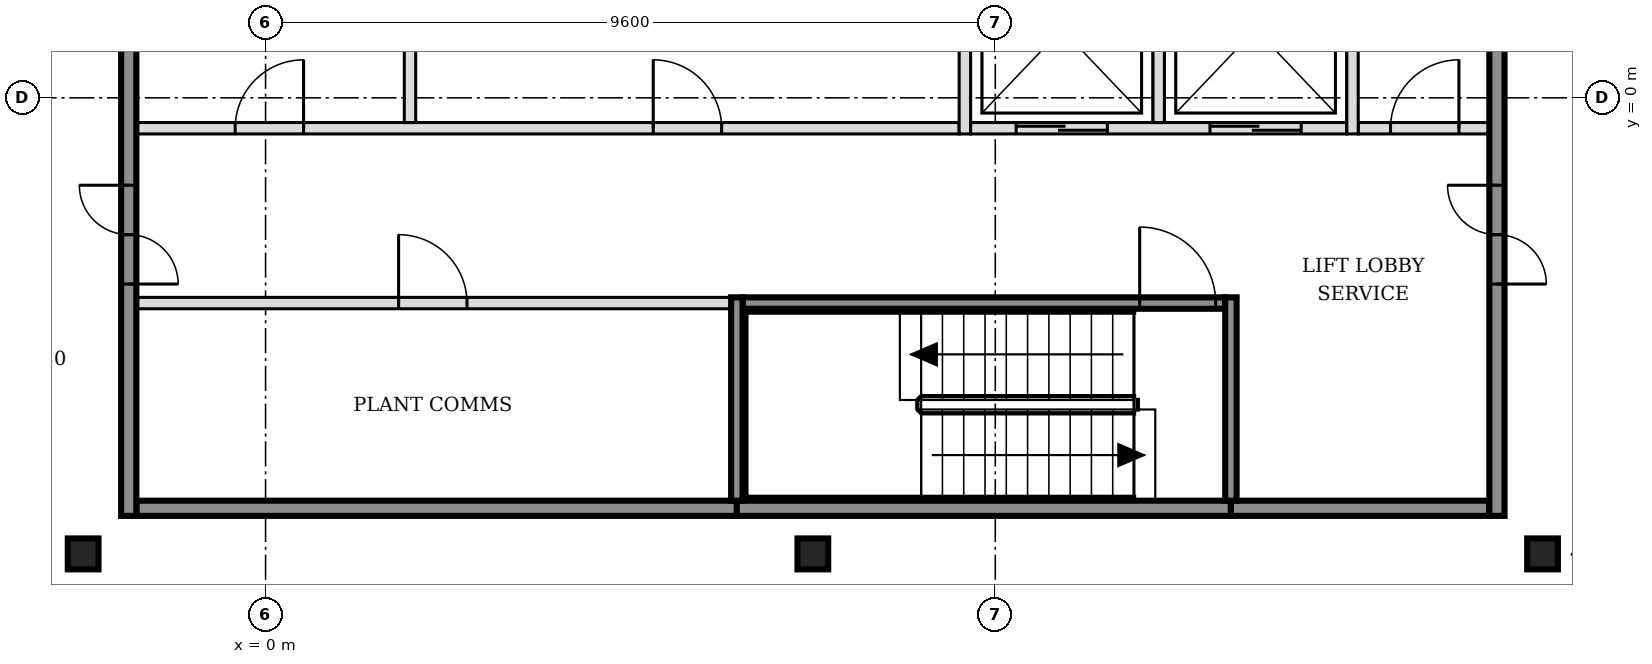
"""IFC4 building model, lengths in metres.
Left out: names, types, materials, properties, quantities, classifications, styles, units other than length and angle.
Written with IfcOpenShell. Run it as: python <this file> out.ifc"""

import sys

from ifc_helpers import new_model, si_unit, direction, frame, frame_2d, origin, origin_2d, place, context, subcontext, project, spatial, rectangle, i_section, extrude, element, fill, save


model = new_model("IFC4")
c1 = context("Model", 3, precision=1e-05, world=origin(), true_north=direction((0.0, 1.0)))
c2 = subcontext(c1, "Body", "Model", "MODEL_VIEW")
j1 = project(units=[si_unit("LENGTHUNIT", "METRE"), si_unit("PLANEANGLEUNIT", "RADIAN")], contexts=[c1])
p1 = place(None, origin())
s1 = spatial("IfcSite", under=j1, at=p1, CompositionType="ELEMENT")
p2 = place(p1, origin())
s2 = spatial("IfcBuilding", under=s1, at=p2, CompositionType="ELEMENT")
p3 = place(p2, frame((0.0, 0.0, 228.6)))
s3 = spatial("IfcBuildingStorey", under=s2, at=p3, CompositionType="ELEMENT", Elevation=228.6)
for number, where, z_axis, x_axis in (
    (1, (-2.4, -6.0, -0.15), (0.0, 0.0, 1.0), (1.0, 0.0, 0.0)),
    (2, (7.2, -6.0, -0.15), (0.0, 0.0, 1.0), (1.0, 0.0, 0.0)),
    (3, (16.8, -6.0, -0.15), (0.0, 0.0, 1.0), (1.0, 0.0, 0.0)),
):
    element("IfcColumn", number, at=place(p3, frame(where, z_axis=z_axis, x_axis=x_axis)), inside=s3, PredefinedType="COLUMN", context=c2, shape_type="SweptSolid", body=[
        extrude(i_section(OverallWidth=0.404, OverallDepth=0.407, WebThickness=0.027, FlangeThickness=0.044, FilletRadius=0.015, at=origin_2d()), origin(), (0.0, 0.0, 1.0), 3.6),
    ])
p4 = place(p3, frame((-1.7, -5.4, 0.0), z_axis=(0.0, 0.0, 1.0), x_axis=(1.0, 0.0, 0.0)))
e4 = element("IfcWall", 4, at=p4, inside=s3, PredefinedType="SOLIDWALL", context=c2, shape_type="SweptSolid", body=[
    extrude(rectangle(XDim=7.9, YDim=0.2, at=frame_2d((3.95, 0.0))), origin(), (0.0, 0.0, 1.0), 3.45),
])
p5 = place(p3, frame((6.2, -5.4, 0.0), z_axis=(0.0, 0.0, 1.0), x_axis=(1.0, 0.0, 0.0)))
e5 = element("IfcWall", 5, at=p5, inside=s3, PredefinedType="SOLIDWALL", context=c2, shape_type="SweptSolid", body=[
    extrude(rectangle(XDim=6.5, YDim=0.2, at=frame_2d((3.25, 0.0))), origin(), (0.0, 0.0, 1.0), 3.45),
])
p6 = place(p3, frame((12.7, -5.4, 0.0), z_axis=(0.0, 0.0, 1.0), x_axis=(1.0, 0.0, 0.0)))
e6 = element("IfcWall", 6, at=p6, inside=s3, PredefinedType="SOLIDWALL", context=c2, shape_type="SweptSolid", body=[
    extrude(rectangle(XDim=3.4, YDim=0.2, at=frame_2d((1.7, 0.0))), origin(), (0.0, 0.0, 1.0), 3.45),
])
p7 = place(p3, frame((-1.7, -2.7, 0.0), z_axis=(0.0, 0.0, 1.0), x_axis=(1.0, 0.0, 0.0)))
e7 = element("IfcWall", 7, at=p7, inside=s3, PredefinedType="PARTITIONING", context=c2, shape_type="SweptSolid", body=[
    extrude(rectangle(XDim=7.825, YDim=0.15, at=frame_2d((3.913, 0.0))), origin(), (0.0, 0.0, 1.0), 3.45),
])
p8 = place(p7, frame((3.45, 0.0, 0.0)))
e8 = element("IfcOpeningElement", 8, at=p8, cuts=e7, PredefinedType="OPENING", context=c2, shape_type="SweptSolid", body=[
    extrude(rectangle(XDim=0.9, YDim=2.1, at=frame_2d((0.45, 1.05))), frame((0.0, 0.085, 0.0), z_axis=(0.0, -1.0, 0.0), x_axis=(1.0, 0.0, 0.0)), (0.0, 0.0, 1.0), 0.17),
])
p9 = place(p3, frame((6.275, -2.7, 0.0), z_axis=(0.0, 0.0, 1.0), x_axis=(1.0, 0.0, 0.0)))
e9 = element("IfcWall", 9, at=p9, inside=s3, PredefinedType="SOLIDWALL", context=c2, shape_type="SweptSolid", body=[
    extrude(rectangle(XDim=6.35, YDim=0.15, at=frame_2d((3.175, 0.0))), origin(), (0.0, 0.0, 1.0), 3.45),
])
p10 = place(p9, frame((5.225, 0.0, 0.0)))
e10 = element("IfcOpeningElement", 10, at=p10, cuts=e9, PredefinedType="OPENING", context=c2, shape_type="SweptSolid", body=[
    extrude(rectangle(XDim=1.0, YDim=2.1, at=frame_2d((0.5, 1.05))), frame((0.0, 0.085, 0.0), z_axis=(0.0, -1.0, 0.0), x_axis=(1.0, 0.0, 0.0)), (0.0, 0.0, 1.0), 0.17),
])
p11 = place(p3, frame((-1.7, -0.4, 0.0), z_axis=(0.0, 0.0, 1.0), x_axis=(1.0, 0.0, 0.0)))
e11 = element("IfcWall", 11, at=p11, inside=s3, PredefinedType="PARTITIONING", context=c2, shape_type="SweptSolid", body=[
    extrude(rectangle(XDim=10.825, YDim=0.15, at=frame_2d((5.413, 0.0))), origin(), (0.0, 0.0, 1.0), 3.45),
])
p12 = place(p11, frame((1.3, 0.0, 0.0)))
e12 = element("IfcOpeningElement", 12, at=p12, cuts=e11, PredefinedType="OPENING", context=c2, shape_type="SweptSolid", body=[
    extrude(rectangle(XDim=0.9, YDim=2.1, at=frame_2d((0.45, 1.05))), frame((0.0, 0.085, 0.0), z_axis=(0.0, -1.0, 0.0), x_axis=(1.0, 0.0, 0.0)), (0.0, 0.0, 1.0), 0.17),
])
p13 = place(p11, frame((6.8, 0.0, 0.0)))
e13 = element("IfcOpeningElement", 13, at=p13, cuts=e11, PredefinedType="OPENING", context=c2, shape_type="SweptSolid", body=[
    extrude(rectangle(XDim=0.9, YDim=2.1, at=frame_2d((0.45, 1.05))), frame((0.0, 0.085, 0.0), z_axis=(0.0, -1.0, 0.0), x_axis=(1.0, 0.0, 0.0)), (0.0, 0.0, 1.0), 0.17),
])
p14 = place(p3, frame((9.275, -0.4, 0.0), z_axis=(0.0, 0.0, 1.0), x_axis=(1.0, 0.0, 0.0)))
e14 = element("IfcWall", 14, at=p14, inside=s3, PredefinedType="SOLIDWALL", context=c2, shape_type="SweptSolid", body=[
    extrude(rectangle(XDim=4.95, YDim=0.15, at=frame_2d((2.475, 0.0))), origin(), (0.0, 0.0, 1.0), 3.45),
])
p15 = place(p14, frame((0.6, 0.0, 0.0)))
e15 = element("IfcOpeningElement", 15, at=p15, cuts=e14, PredefinedType="OPENING", context=c2, shape_type="SweptSolid", body=[
    extrude(rectangle(XDim=1.2, YDim=2.1, at=frame_2d((0.6, 1.05))), frame((0.0, 0.085, 0.0), z_axis=(0.0, -1.0, 0.0), x_axis=(1.0, 0.0, 0.0)), (0.0, 0.0, 1.0), 0.17),
])
p16 = place(p14, frame((3.15, 0.0, 0.0)))
e16 = element("IfcOpeningElement", 16, at=p16, cuts=e14, PredefinedType="OPENING", context=c2, shape_type="SweptSolid", body=[
    extrude(rectangle(XDim=1.2, YDim=2.1, at=frame_2d((0.6, 1.05))), frame((0.0, 0.085, 0.0), z_axis=(0.0, -1.0, 0.0), x_axis=(1.0, 0.0, 0.0)), (0.0, 0.0, 1.0), 0.17),
])
p17 = place(p3, frame((14.375, -0.4, 0.0), z_axis=(0.0, 0.0, 1.0), x_axis=(1.0, 0.0, 0.0)))
e17 = element("IfcWall", 17, at=p17, inside=s3, PredefinedType="PARTITIONING", context=c2, shape_type="SweptSolid", body=[
    extrude(rectangle(XDim=1.725, YDim=0.15, at=frame_2d((0.863, 0.0))), origin(), (0.0, 0.0, 1.0), 3.45),
])
p18 = place(p17, frame((0.425, 0.0, 0.0)))
e18 = element("IfcOpeningElement", 18, at=p18, cuts=e17, PredefinedType="OPENING", context=c2, shape_type="SweptSolid", body=[
    extrude(rectangle(XDim=0.9, YDim=2.1, at=frame_2d((0.45, 1.05))), frame((0.0, 0.085, 0.0), z_axis=(0.0, -1.0, 0.0), x_axis=(1.0, 0.0, 0.0)), (0.0, 0.0, 1.0), 0.17),
])
p19 = place(p3, frame((-1.8, -5.5, 0.0), z_axis=(0.0, 0.0, 1.0), x_axis=(0.0, 1.0, 0.0)))
e19 = element("IfcWall", 19, at=p19, inside=s3, PredefinedType="SOLIDWALL", context=c2, shape_type="SweptSolid", body=[
    extrude(rectangle(XDim=15.8, YDim=0.2, at=frame_2d((7.9, 0.0))), origin(), (0.0, 0.0, 1.0), 3.45),
])
p20 = place(p19, frame((3.05, 0.0, 0.0)))
e20 = element("IfcOpeningElement", 20, at=p20, cuts=e19, PredefinedType="OPENING", context=c2, shape_type="SweptSolid", body=[
    extrude(rectangle(XDim=1.3, YDim=2.1, at=frame_2d((0.65, 1.05))), frame((0.0, 0.11, 0.0), z_axis=(0.0, -1.0, 0.0), x_axis=(1.0, 0.0, 0.0)), (0.0, 0.0, 1.0), 0.22),
])
p21 = place(p19, frame((11.45, 0.0, 0.0)))
e21 = element("IfcOpeningElement", 21, at=p21, cuts=e19, PredefinedType="OPENING", context=c2, shape_type="SweptSolid", body=[
    extrude(rectangle(XDim=1.3, YDim=2.1, at=frame_2d((0.65, 1.05))), frame((0.0, 0.11, 0.0), z_axis=(0.0, -1.0, 0.0), x_axis=(1.0, 0.0, 0.0)), (0.0, 0.0, 1.0), 0.22),
])
p22 = place(p3, frame((1.9, -0.325, 0.0), z_axis=(0.0, 0.0, 1.0), x_axis=(0.0, 1.0, 0.0)))
e22 = element("IfcWall", 22, at=p22, inside=s3, PredefinedType="PARTITIONING", context=c2, shape_type="SweptSolid", body=[
    extrude(rectangle(XDim=2.45, YDim=0.15, at=frame_2d((1.225, 0.0))), origin(), (0.0, 0.0, 1.0), 3.45),
])
p23 = place(p3, frame((6.2, -5.3, 0.0), z_axis=(0.0, 0.0, 1.0), x_axis=(0.0, 1.0, 0.0)))
e23 = element("IfcWall", 23, at=p23, inside=s3, PredefinedType="SOLIDWALL", context=c2, shape_type="SweptSolid", body=[
    extrude(rectangle(XDim=2.675, YDim=0.15, at=frame_2d((1.337, 0.0))), origin(), (0.0, 0.0, 1.0), 3.45),
])
p24 = place(p3, frame((9.2, -0.475, 0.0), z_axis=(0.0, 0.0, 1.0), x_axis=(0.0, 1.0, 0.0)))
e24 = element("IfcWall", 24, at=p24, inside=s3, PredefinedType="SOLIDWALL", context=c2, shape_type="SweptSolid", body=[
    extrude(rectangle(XDim=2.6, YDim=0.15, at=frame_2d((1.3, 0.0))), origin(), (0.0, 0.0, 1.0), 3.45),
])
p25 = place(p3, frame((11.75, -0.325, 0.0), z_axis=(0.0, 0.0, 1.0), x_axis=(0.0, 1.0, 0.0)))
e25 = element("IfcWall", 25, at=p25, inside=s3, PredefinedType="SOLIDWALL", context=c2, shape_type="SweptSolid", body=[
    extrude(rectangle(XDim=2.45, YDim=0.15, at=frame_2d((1.225, 0.0))), origin(), (0.0, 0.0, 1.0), 3.45),
])
p26 = place(p3, frame((12.7, -5.3, 0.0), z_axis=(0.0, 0.0, 1.0), x_axis=(0.0, 1.0, 0.0)))
e26 = element("IfcWall", 26, at=p26, inside=s3, PredefinedType="SOLIDWALL", context=c2, shape_type="SweptSolid", body=[
    extrude(rectangle(XDim=2.675, YDim=0.15, at=frame_2d((1.337, 0.0))), origin(), (0.0, 0.0, 1.0), 3.45),
])
p27 = place(p3, frame((14.3, -0.475, 0.0), z_axis=(0.0, 0.0, 1.0), x_axis=(0.0, 1.0, 0.0)))
e27 = element("IfcWall", 27, at=p27, inside=s3, PredefinedType="SOLIDWALL", context=c2, shape_type="SweptSolid", body=[
    extrude(rectangle(XDim=2.75, YDim=0.15, at=frame_2d((1.375, 0.0))), origin(), (0.0, 0.0, 1.0), 3.45),
])
p28 = place(p3, frame((16.2, -5.5, 0.0), z_axis=(0.0, 0.0, 1.0), x_axis=(0.0, 1.0, 0.0)))
e28 = element("IfcWall", 28, at=p28, inside=s3, PredefinedType="SOLIDWALL", context=c2, shape_type="SweptSolid", body=[
    extrude(rectangle(XDim=15.8, YDim=0.2, at=frame_2d((7.9, 0.0))), origin(), (0.0, 0.0, 1.0), 3.45),
])
p29 = place(p28, frame((3.05, 0.0, 0.0)))
e29 = element("IfcOpeningElement", 29, at=p29, cuts=e28, PredefinedType="OPENING", context=c2, shape_type="SweptSolid", body=[
    extrude(rectangle(XDim=1.3, YDim=2.1, at=frame_2d((0.65, 1.05))), frame((0.0, 0.11, 0.0), z_axis=(0.0, -1.0, 0.0), x_axis=(1.0, 0.0, 0.0)), (0.0, 0.0, 1.0), 0.22),
])
p30 = place(p28, frame((11.45, 0.0, 0.0)))
e30 = element("IfcOpeningElement", 30, at=p30, cuts=e28, PredefinedType="OPENING", context=c2, shape_type="SweptSolid", body=[
    extrude(rectangle(XDim=1.3, YDim=2.1, at=frame_2d((0.65, 1.05))), frame((0.0, 0.11, 0.0), z_axis=(0.0, -1.0, 0.0), x_axis=(1.0, 0.0, 0.0)), (0.0, 0.0, 1.0), 0.22),
])
p31 = place(p3, frame((16.722, -14.272, 0.0), z_axis=(0.0, 0.0, 1.0), x_axis=(0.707106781187, 0.707106781187, 0.0)))
e31 = element("IfcWall", 31, at=p31, inside=s3, PredefinedType="PARTITIONING", context=c2, shape_type="SweptSolid", body=[
    extrude(rectangle(XDim=20.049, YDim=0.15, at=frame_2d((10.025, 0.0))), origin(), (0.0, 0.0, 1.0), 2.73),
])
p32 = place(p31, frame((4.892, 0.0, 0.0)))
e32 = element("IfcOpeningElement", 32, at=p32, cuts=e31, PredefinedType="OPENING", context=c2, shape_type="SweptSolid", body=[
    extrude(rectangle(XDim=0.9, YDim=2.1, at=frame_2d((0.45, 1.05))), frame((0.0, 0.085, 0.0), z_axis=(0.0, -1.0, 0.0), x_axis=(1.0, 0.0, 0.0)), (0.0, 0.0, 1.0), 0.17),
])
p33 = place(p31, frame((10.042, 0.0, 0.0)))
e33 = element("IfcOpeningElement", 33, at=p33, cuts=e31, PredefinedType="OPENING", context=c2, shape_type="SweptSolid", body=[
    extrude(rectangle(XDim=0.9, YDim=2.1, at=frame_2d((0.45, 1.05))), frame((0.0, 0.085, 0.0), z_axis=(0.0, -1.0, 0.0), x_axis=(1.0, 0.0, 0.0)), (0.0, 0.0, 1.0), 0.17),
])
p34 = place(p31, frame((14.443, 0.0, 0.0)))
e34 = element("IfcOpeningElement", 34, at=p34, cuts=e31, PredefinedType="OPENING", context=c2, shape_type="SweptSolid", body=[
    extrude(rectangle(XDim=0.9, YDim=2.1, at=frame_2d((0.45, 1.05))), frame((0.0, 0.085, 0.0), z_axis=(0.0, -1.0, 0.0), x_axis=(1.0, 0.0, 0.0)), (0.0, 0.0, 1.0), 0.17),
])
p35 = place(p31, frame((17.837, 0.0, 0.0)))
e35 = element("IfcOpeningElement", 35, at=p35, cuts=e31, PredefinedType="OPENING", context=c2, shape_type="SweptSolid", body=[
    extrude(rectangle(XDim=0.9, YDim=2.1, at=frame_2d((0.45, 1.05))), frame((0.0, 0.085, 0.0), z_axis=(0.0, -1.0, 0.0), x_axis=(1.0, 0.0, 0.0)), (0.0, 0.0, 1.0), 0.17),
])
p36 = place(p15, origin())
e36 = element("IfcDoor", 36, at=p36, inside=s3, OperationType="DOUBLE_DOOR_SLIDING", PredefinedType="DOOR", context=c2, shape_type="SweptSolid", body=[
    extrude(rectangle(XDim=1.2, YDim=2.1, at=frame_2d((0.6, 1.05))), frame((0.0, 0.025, 0.0), z_axis=(0.0, -1.0, 0.0), x_axis=(1.0, 0.0, 0.0)), (0.0, 0.0, 1.0), 0.05),
])
fill(e15, e36)
p37 = place(p16, origin())
e37 = element("IfcDoor", 37, at=p37, inside=s3, OperationType="DOUBLE_DOOR_SLIDING", PredefinedType="DOOR", context=c2, shape_type="SweptSolid", body=[
    extrude(rectangle(XDim=1.2, YDim=2.1, at=frame_2d((0.6, 1.05))), frame((0.0, 0.025, 0.0), z_axis=(0.0, -1.0, 0.0), x_axis=(1.0, 0.0, 0.0)), (0.0, 0.0, 1.0), 0.05),
])
fill(e16, e37)
p38 = place(p10, origin())
e38 = element("IfcDoor", 38, at=p38, inside=s3, OperationType="SINGLE_SWING_LEFT", PredefinedType="DOOR", context=c2, shape_type="SweptSolid", body=[
    extrude(rectangle(XDim=1.0, YDim=2.1, at=frame_2d((0.5, 1.05))), frame((0.0, 0.025, 0.0), z_axis=(0.0, -1.0, 0.0), x_axis=(1.0, 0.0, 0.0)), (0.0, 0.0, 1.0), 0.05),
])
fill(e10, e38)
p39 = place(p20, origin())
e39 = element("IfcDoor", 39, at=p39, inside=s3, OperationType="DOUBLE_DOOR_SINGLE_SWING", PredefinedType="DOOR", context=c2, shape_type="SweptSolid", body=[
    extrude(rectangle(XDim=1.3, YDim=2.1, at=frame_2d((0.65, 1.05))), frame((0.0, 0.025, 0.0), z_axis=(0.0, -1.0, 0.0), x_axis=(1.0, 0.0, 0.0)), (0.0, 0.0, 1.0), 0.05),
])
fill(e20, e39)
p40 = place(p29, origin())
e40 = element("IfcDoor", 40, at=p40, inside=s3, OperationType="DOUBLE_DOOR_SINGLE_SWING", PredefinedType="DOOR", context=c2, shape_type="SweptSolid", body=[
    extrude(rectangle(XDim=1.3, YDim=2.1, at=frame_2d((0.65, 1.05))), frame((0.0, 0.025, 0.0), z_axis=(0.0, -1.0, 0.0), x_axis=(1.0, 0.0, 0.0)), (0.0, 0.0, 1.0), 0.05),
])
fill(e29, e40)
p41 = place(p18, origin())
e41 = element("IfcDoor", 41, at=p41, inside=s3, OperationType="SINGLE_SWING_RIGHT", PredefinedType="DOOR", context=c2, shape_type="SweptSolid", body=[
    extrude(rectangle(XDim=0.9, YDim=2.1, at=frame_2d((0.45, 1.05))), frame((0.0, 0.025, 0.0), z_axis=(0.0, -1.0, 0.0), x_axis=(1.0, 0.0, 0.0)), (0.0, 0.0, 1.0), 0.05),
])
fill(e18, e41)
p42 = place(p8, origin())
e42 = element("IfcDoor", 42, at=p42, inside=s3, OperationType="SINGLE_SWING_LEFT", PredefinedType="DOOR", context=c2, shape_type="SweptSolid", body=[
    extrude(rectangle(XDim=0.9, YDim=2.1, at=frame_2d((0.45, 1.05))), frame((0.0, 0.025, 0.0), z_axis=(0.0, -1.0, 0.0), x_axis=(1.0, 0.0, 0.0)), (0.0, 0.0, 1.0), 0.05),
])
fill(e8, e42)
p43 = place(p12, origin())
e43 = element("IfcDoor", 43, at=p43, inside=s3, OperationType="SINGLE_SWING_RIGHT", PredefinedType="DOOR", context=c2, shape_type="SweptSolid", body=[
    extrude(rectangle(XDim=0.9, YDim=2.1, at=frame_2d((0.45, 1.05))), frame((0.0, 0.025, 0.0), z_axis=(0.0, -1.0, 0.0), x_axis=(1.0, 0.0, 0.0)), (0.0, 0.0, 1.0), 0.05),
])
fill(e12, e43)
p44 = place(p13, origin())
e44 = element("IfcDoor", 44, at=p44, inside=s3, OperationType="SINGLE_SWING_LEFT", PredefinedType="DOOR", context=c2, shape_type="SweptSolid", body=[
    extrude(rectangle(XDim=0.9, YDim=2.1, at=frame_2d((0.45, 1.05))), frame((0.0, 0.025, 0.0), z_axis=(0.0, -1.0, 0.0), x_axis=(1.0, 0.0, 0.0)), (0.0, 0.0, 1.0), 0.05),
])
fill(e13, e44)
save(model, sys.argv[1])
